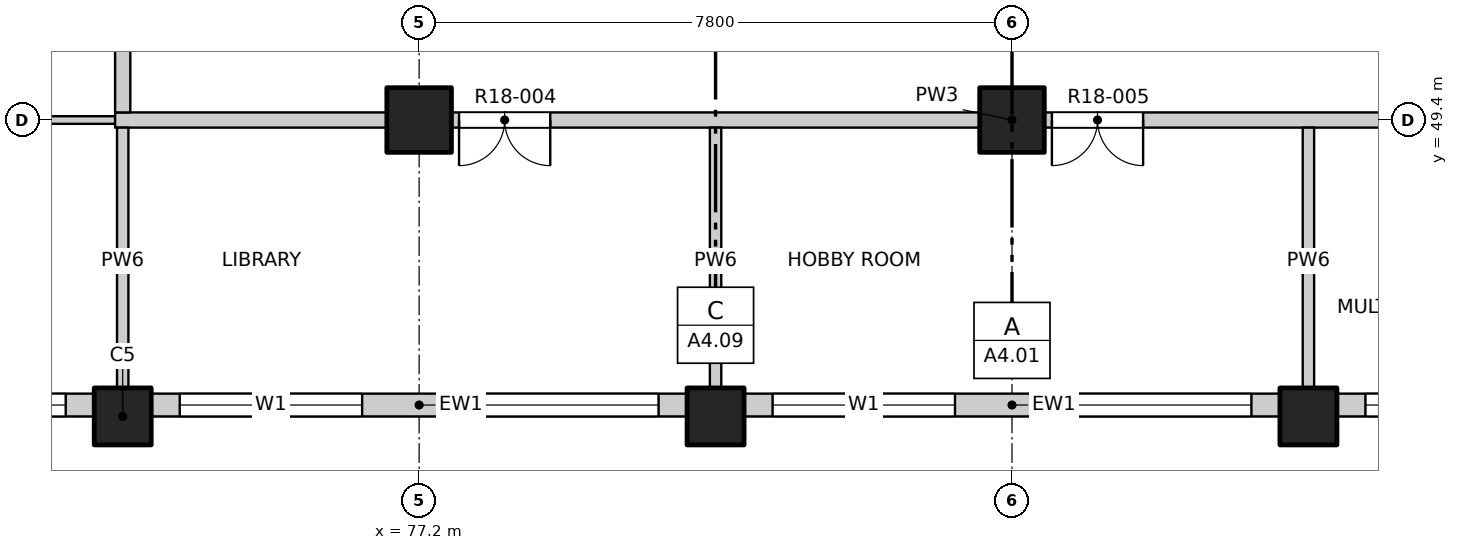
"""IFC4 building model, lengths in metres.
Left out: names, types, materials, properties, quantities, classifications, styles, units other than length and angle.
Written with IfcOpenShell. Run it as: python <this file> out.ifc"""

import sys

from ifc_helpers import new_model, si_unit, direction, frame, frame_2d, origin, origin_2d, place, context, subcontext, project, spatial, rectangle, extrude, element, fill, save


model = new_model("IFC4")
c1 = context("Model", 3, precision=1e-05, world=origin(), true_north=direction((0.0, 1.0)))
c2 = subcontext(c1, "Body", "Model", "MODEL_VIEW")
j1 = project(units=[si_unit("LENGTHUNIT", "METRE"), si_unit("PLANEANGLEUNIT", "RADIAN")], contexts=[c1])
p1 = place(None, origin())
s1 = spatial("IfcSite", under=j1, at=p1, CompositionType="ELEMENT")
p2 = place(p1, origin())
s2 = spatial("IfcBuilding", under=s1, at=p2, CompositionType="ELEMENT")
p3 = place(p2, frame((0.0, 0.0, 189.4)))
s3 = spatial("IfcBuildingStorey", under=s2, at=p3, CompositionType="ELEMENT", Elevation=189.4)
for number, where, z_axis, x_axis in (
    (1, (73.3, 45.5, -0.25), (0.0, 0.0, 1.0), (1.0, 0.0, 0.0)),
    (2, (81.1, 45.5, -0.25), (0.0, 0.0, 1.0), (1.0, 0.0, 0.0)),
    (3, (88.9, 45.5, -0.25), (0.0, 0.0, 1.0), (1.0, 0.0, 0.0)),
):
    element("IfcColumn", number, at=place(p3, frame(where, z_axis=z_axis, x_axis=x_axis)), inside=s3, PredefinedType="COLUMN", context=c2, shape_type="SweptSolid", body=[
        extrude(rectangle(XDim=0.75, YDim=0.75, at=origin_2d()), origin(), (0.0, 0.0, 1.0), 3.35),
    ])
for number, where, z_axis, x_axis in (
    (4, (77.2, 49.4, -0.25), (0.0, 0.0, 1.0), (1.0, 0.0, 0.0)),
    (5, (85.0, 49.4, -0.25), (0.0, 0.0, 1.0), (1.0, 0.0, 0.0)),
):
    element("IfcColumn", number, at=place(p3, frame(where, z_axis=z_axis, x_axis=x_axis)), inside=s3, PredefinedType="COLUMN", context=c2, shape_type="SweptSolid", body=[
        extrude(rectangle(XDim=0.85, YDim=0.85, at=origin_2d()), origin(), (0.0, 0.0, 1.0), 3.35),
    ])
p4 = place(p3, frame((69.4, 45.65, 0.0), z_axis=(0.0, 0.0, 1.0), x_axis=(1.0, 0.0, 0.0)))
e6 = element("IfcWall", 6, at=p4, inside=s3, PredefinedType="SOLIDWALL", context=c2, shape_type="SweptSolid", body=[
    extrude(rectangle(XDim=3.525, YDim=0.3, at=frame_2d((1.763, 0.0))), origin(), (0.0, 0.0, 1.0), 3.1),
])
p5 = place(p4, frame((0.75, 0.0, 0.9)))
e7 = element("IfcOpeningElement", 7, at=p5, cuts=e6, PredefinedType="OPENING", context=c2, shape_type="SweptSolid", body=[
    extrude(rectangle(XDim=2.4, YDim=1.8, at=frame_2d((1.2, 0.9))), frame((0.0, 0.16, 0.0), z_axis=(0.0, -1.0, 0.0), x_axis=(1.0, 0.0, 0.0)), (0.0, 0.0, 1.0), 0.32),
])
p6 = place(p3, frame((73.675, 45.65, 0.0), z_axis=(0.0, 0.0, 1.0), x_axis=(1.0, 0.0, 0.0)))
e8 = element("IfcWall", 8, at=p6, inside=s3, PredefinedType="SOLIDWALL", context=c2, shape_type="SweptSolid", body=[
    extrude(rectangle(XDim=7.05, YDim=0.3, at=frame_2d((3.525, 0.0))), origin(), (0.0, 0.0, 1.0), 3.1),
])
p7 = place(p6, frame((0.375, 0.0, 0.9)))
e9 = element("IfcOpeningElement", 9, at=p7, cuts=e8, PredefinedType="OPENING", context=c2, shape_type="SweptSolid", body=[
    extrude(rectangle(XDim=2.4, YDim=1.8, at=frame_2d((1.2, 0.9))), frame((0.0, 0.16, 0.0), z_axis=(0.0, -1.0, 0.0), x_axis=(1.0, 0.0, 0.0)), (0.0, 0.0, 1.0), 0.32),
])
p8 = place(p6, frame((4.275, 0.0, 0.9)))
e10 = element("IfcOpeningElement", 10, at=p8, cuts=e8, PredefinedType="OPENING", context=c2, shape_type="SweptSolid", body=[
    extrude(rectangle(XDim=2.4, YDim=1.8, at=frame_2d((1.2, 0.9))), frame((0.0, 0.16, 0.0), z_axis=(0.0, -1.0, 0.0), x_axis=(1.0, 0.0, 0.0)), (0.0, 0.0, 1.0), 0.32),
])
p9 = place(p3, frame((81.475, 45.65, 0.0), z_axis=(0.0, 0.0, 1.0), x_axis=(1.0, 0.0, 0.0)))
e11 = element("IfcWall", 11, at=p9, inside=s3, PredefinedType="SOLIDWALL", context=c2, shape_type="SweptSolid", body=[
    extrude(rectangle(XDim=7.05, YDim=0.3, at=frame_2d((3.525, 0.0))), origin(), (0.0, 0.0, 1.0), 3.1),
])
p10 = place(p9, frame((0.375, 0.0, 0.9)))
e12 = element("IfcOpeningElement", 12, at=p10, cuts=e11, PredefinedType="OPENING", context=c2, shape_type="SweptSolid", body=[
    extrude(rectangle(XDim=2.4, YDim=1.8, at=frame_2d((1.2, 0.9))), frame((0.0, 0.16, 0.0), z_axis=(0.0, -1.0, 0.0), x_axis=(1.0, 0.0, 0.0)), (0.0, 0.0, 1.0), 0.32),
])
p11 = place(p9, frame((4.275, 0.0, 0.9)))
e13 = element("IfcOpeningElement", 13, at=p11, cuts=e11, PredefinedType="OPENING", context=c2, shape_type="SweptSolid", body=[
    extrude(rectangle(XDim=2.4, YDim=1.8, at=frame_2d((1.2, 0.9))), frame((0.0, 0.16, 0.0), z_axis=(0.0, -1.0, 0.0), x_axis=(1.0, 0.0, 0.0)), (0.0, 0.0, 1.0), 0.32),
])
p12 = place(p3, frame((89.275, 45.65, 0.0), z_axis=(0.0, 0.0, 1.0), x_axis=(1.0, 0.0, 0.0)))
e14 = element("IfcWall", 14, at=p12, inside=s3, PredefinedType="SOLIDWALL", context=c2, shape_type="SweptSolid", body=[
    extrude(rectangle(XDim=7.05, YDim=0.3, at=frame_2d((3.525, 0.0))), origin(), (0.0, 0.0, 1.0), 3.1),
])
p13 = place(p12, frame((0.375, 0.0, 0.9)))
e15 = element("IfcOpeningElement", 15, at=p13, cuts=e14, PredefinedType="OPENING", context=c2, shape_type="SweptSolid", body=[
    extrude(rectangle(XDim=2.4, YDim=1.8, at=frame_2d((1.2, 0.9))), frame((0.0, 0.16, 0.0), z_axis=(0.0, -1.0, 0.0), x_axis=(1.0, 0.0, 0.0)), (0.0, 0.0, 1.0), 0.32),
])
p14 = place(p12, frame((4.275, 0.0, 0.9)))
e16 = element("IfcOpeningElement", 16, at=p14, cuts=e14, PredefinedType="OPENING", context=c2, shape_type="SweptSolid", body=[
    extrude(rectangle(XDim=2.4, YDim=1.8, at=frame_2d((1.2, 0.9))), frame((0.0, 0.16, 0.0), z_axis=(0.0, -1.0, 0.0), x_axis=(1.0, 0.0, 0.0)), (0.0, 0.0, 1.0), 0.32),
])
p15 = place(p3, frame((65.8, 49.4, 0.0), z_axis=(0.0, 0.0, 1.0), x_axis=(1.0, 0.0, 0.0)))
e17 = element("IfcWall", 17, at=p15, inside=s3, PredefinedType="PARTITIONING", context=c2, shape_type="SweptSolid", body=[
    extrude(rectangle(XDim=7.6, YDim=0.1, at=frame_2d((3.8, 0.0))), origin(), (0.0, 0.0, 1.0), 3.1),
])
p16 = place(p15, frame((4.14, 0.0, 0.0)))
e18 = element("IfcOpeningElement", 18, at=p16, cuts=e17, PredefinedType="OPENING", context=c2, shape_type="SweptSolid", body=[
    extrude(rectangle(XDim=0.9, YDim=2.1, at=frame_2d((0.45, 1.05))), frame((0.0, 0.06, 0.0), z_axis=(0.0, -1.0, 0.0), x_axis=(1.0, 0.0, 0.0)), (0.0, 0.0, 1.0), 0.12),
])
p17 = place(p3, frame((73.2, 49.4, 0.0), z_axis=(0.0, 0.0, 1.0), x_axis=(1.0, 0.0, 0.0)))
e19 = element("IfcWall", 19, at=p17, inside=s3, PredefinedType="PARTITIONING", context=c2, shape_type="SweptSolid", body=[
    extrude(rectangle(XDim=23.6, YDim=0.2, at=frame_2d((11.8, 0.0))), origin(), (0.0, 0.0, 1.0), 3.1),
])
p18 = place(p17, frame((4.525, 0.0, 0.0)))
e20 = element("IfcOpeningElement", 20, at=p18, cuts=e19, PredefinedType="OPENING", context=c2, shape_type="SweptSolid", body=[
    extrude(rectangle(XDim=1.2, YDim=2.1, at=frame_2d((0.6, 1.05))), frame((0.0, 0.11, 0.0), z_axis=(0.0, -1.0, 0.0), x_axis=(1.0, 0.0, 0.0)), (0.0, 0.0, 1.0), 0.22),
])
p19 = place(p17, frame((12.325, 0.0, 0.0)))
e21 = element("IfcOpeningElement", 21, at=p19, cuts=e19, PredefinedType="OPENING", context=c2, shape_type="SweptSolid", body=[
    extrude(rectangle(XDim=1.2, YDim=2.1, at=frame_2d((0.6, 1.05))), frame((0.0, 0.11, 0.0), z_axis=(0.0, -1.0, 0.0), x_axis=(1.0, 0.0, 0.0)), (0.0, 0.0, 1.0), 0.22),
])
p20 = place(p17, frame((20.125, 0.0, 0.0)))
e22 = element("IfcOpeningElement", 22, at=p20, cuts=e19, PredefinedType="OPENING", context=c2, shape_type="SweptSolid", body=[
    extrude(rectangle(XDim=1.2, YDim=2.1, at=frame_2d((0.6, 1.05))), frame((0.0, 0.11, 0.0), z_axis=(0.0, -1.0, 0.0), x_axis=(1.0, 0.0, 0.0)), (0.0, 0.0, 1.0), 0.22),
])
p21 = place(p3, frame((73.3, 45.8, 0.0), z_axis=(0.0, 0.0, 1.0), x_axis=(0.0, 1.0, 0.0)))
e23 = element("IfcWall", 23, at=p21, inside=s3, PredefinedType="PARTITIONING", context=c2, shape_type="SweptSolid", body=[
    extrude(rectangle(XDim=3.5, YDim=0.15, at=frame_2d((1.75, 0.0))), origin(), (0.0, 0.0, 1.0), 3.1),
])
p22 = place(p3, frame((73.3, 49.5, 0.0), z_axis=(0.0, 0.0, 1.0), x_axis=(0.0, 1.0, 0.0)))
e24 = element("IfcWall", 24, at=p22, inside=s3, PredefinedType="PARTITIONING", context=c2, shape_type="SweptSolid", body=[
    extrude(rectangle(XDim=34.7, YDim=0.2, at=frame_2d((17.35, 0.0))), origin(), (0.0, 0.0, 1.0), 3.1),
])
p23 = place(p22, frame((13.825, 0.0, 0.0)))
e25 = element("IfcOpeningElement", 25, at=p23, cuts=e24, PredefinedType="OPENING", context=c2, shape_type="SweptSolid", body=[
    extrude(rectangle(XDim=1.0, YDim=2.1, at=frame_2d((0.5, 1.05))), frame((0.0, 0.11, 0.0), z_axis=(0.0, -1.0, 0.0), x_axis=(1.0, 0.0, 0.0)), (0.0, 0.0, 1.0), 0.22),
])
p24 = place(p22, frame((21.975, 0.0, 0.0)))
e26 = element("IfcOpeningElement", 26, at=p24, cuts=e24, PredefinedType="OPENING", context=c2, shape_type="SweptSolid", body=[
    extrude(rectangle(XDim=1.0, YDim=2.1, at=frame_2d((0.5, 1.05))), frame((0.0, 0.11, 0.0), z_axis=(0.0, -1.0, 0.0), x_axis=(1.0, 0.0, 0.0)), (0.0, 0.0, 1.0), 0.22),
])
for number, where, z_axis, x_axis in (
    (27, (81.1, 45.8, 0.0), (0.0, 0.0, 1.0), (0.0, 1.0, 0.0)),
    (28, (88.9, 45.8, 0.0), (0.0, 0.0, 1.0), (0.0, 1.0, 0.0)),
):
    element("IfcWall", number, at=place(p3, frame(where, z_axis=z_axis, x_axis=x_axis)), inside=s3, PredefinedType="PARTITIONING", context=c2, shape_type="SweptSolid", body=[
        extrude(rectangle(XDim=3.5, YDim=0.15, at=frame_2d((1.75, 0.0))), origin(), (0.0, 0.0, 1.0), 3.1),
    ])
p25 = place(p5, origin())
e29 = element("IfcWindow", 29, at=p25, inside=s3, PartitioningType="DOUBLE_PANEL_VERTICAL", PredefinedType="WINDOW", context=c2, shape_type="SweptSolid", body=[
    extrude(rectangle(XDim=2.4, YDim=1.8, at=frame_2d((1.2, 0.9))), frame((0.0, 0.03, 0.0), z_axis=(0.0, -1.0, 0.0), x_axis=(1.0, 0.0, 0.0)), (0.0, 0.0, 1.0), 0.06),
])
fill(e7, e29)
p26 = place(p7, origin())
e30 = element("IfcWindow", 30, at=p26, inside=s3, PartitioningType="DOUBLE_PANEL_VERTICAL", PredefinedType="WINDOW", context=c2, shape_type="SweptSolid", body=[
    extrude(rectangle(XDim=2.4, YDim=1.8, at=frame_2d((1.2, 0.9))), frame((0.0, 0.03, 0.0), z_axis=(0.0, -1.0, 0.0), x_axis=(1.0, 0.0, 0.0)), (0.0, 0.0, 1.0), 0.06),
])
fill(e9, e30)
p27 = place(p8, origin())
e31 = element("IfcWindow", 31, at=p27, inside=s3, PartitioningType="DOUBLE_PANEL_VERTICAL", PredefinedType="WINDOW", context=c2, shape_type="SweptSolid", body=[
    extrude(rectangle(XDim=2.4, YDim=1.8, at=frame_2d((1.2, 0.9))), frame((0.0, 0.03, 0.0), z_axis=(0.0, -1.0, 0.0), x_axis=(1.0, 0.0, 0.0)), (0.0, 0.0, 1.0), 0.06),
])
fill(e10, e31)
p28 = place(p10, origin())
e32 = element("IfcWindow", 32, at=p28, inside=s3, PartitioningType="DOUBLE_PANEL_VERTICAL", PredefinedType="WINDOW", context=c2, shape_type="SweptSolid", body=[
    extrude(rectangle(XDim=2.4, YDim=1.8, at=frame_2d((1.2, 0.9))), frame((0.0, 0.03, 0.0), z_axis=(0.0, -1.0, 0.0), x_axis=(1.0, 0.0, 0.0)), (0.0, 0.0, 1.0), 0.06),
])
fill(e12, e32)
p29 = place(p11, origin())
e33 = element("IfcWindow", 33, at=p29, inside=s3, PartitioningType="DOUBLE_PANEL_VERTICAL", PredefinedType="WINDOW", context=c2, shape_type="SweptSolid", body=[
    extrude(rectangle(XDim=2.4, YDim=1.8, at=frame_2d((1.2, 0.9))), frame((0.0, 0.03, 0.0), z_axis=(0.0, -1.0, 0.0), x_axis=(1.0, 0.0, 0.0)), (0.0, 0.0, 1.0), 0.06),
])
fill(e13, e33)
p30 = place(p13, origin())
e34 = element("IfcWindow", 34, at=p30, inside=s3, PartitioningType="DOUBLE_PANEL_VERTICAL", PredefinedType="WINDOW", context=c2, shape_type="SweptSolid", body=[
    extrude(rectangle(XDim=2.4, YDim=1.8, at=frame_2d((1.2, 0.9))), frame((0.0, 0.03, 0.0), z_axis=(0.0, -1.0, 0.0), x_axis=(1.0, 0.0, 0.0)), (0.0, 0.0, 1.0), 0.06),
])
fill(e15, e34)
p31 = place(p18, origin())
e35 = element("IfcDoor", 35, at=p31, inside=s3, OperationType="DOUBLE_DOOR_SINGLE_SWING", PredefinedType="DOOR", context=c2, shape_type="SweptSolid", body=[
    extrude(rectangle(XDim=1.2, YDim=2.1, at=frame_2d((0.6, 1.05))), frame((0.0, 0.025, 0.0), z_axis=(0.0, -1.0, 0.0), x_axis=(1.0, 0.0, 0.0)), (0.0, 0.0, 1.0), 0.05),
])
fill(e20, e35)
p32 = place(p19, origin())
e36 = element("IfcDoor", 36, at=p32, inside=s3, OperationType="DOUBLE_DOOR_SINGLE_SWING", PredefinedType="DOOR", context=c2, shape_type="SweptSolid", body=[
    extrude(rectangle(XDim=1.2, YDim=2.1, at=frame_2d((0.6, 1.05))), frame((0.0, 0.025, 0.0), z_axis=(0.0, -1.0, 0.0), x_axis=(1.0, 0.0, 0.0)), (0.0, 0.0, 1.0), 0.05),
])
fill(e21, e36)
save(model, sys.argv[1])
